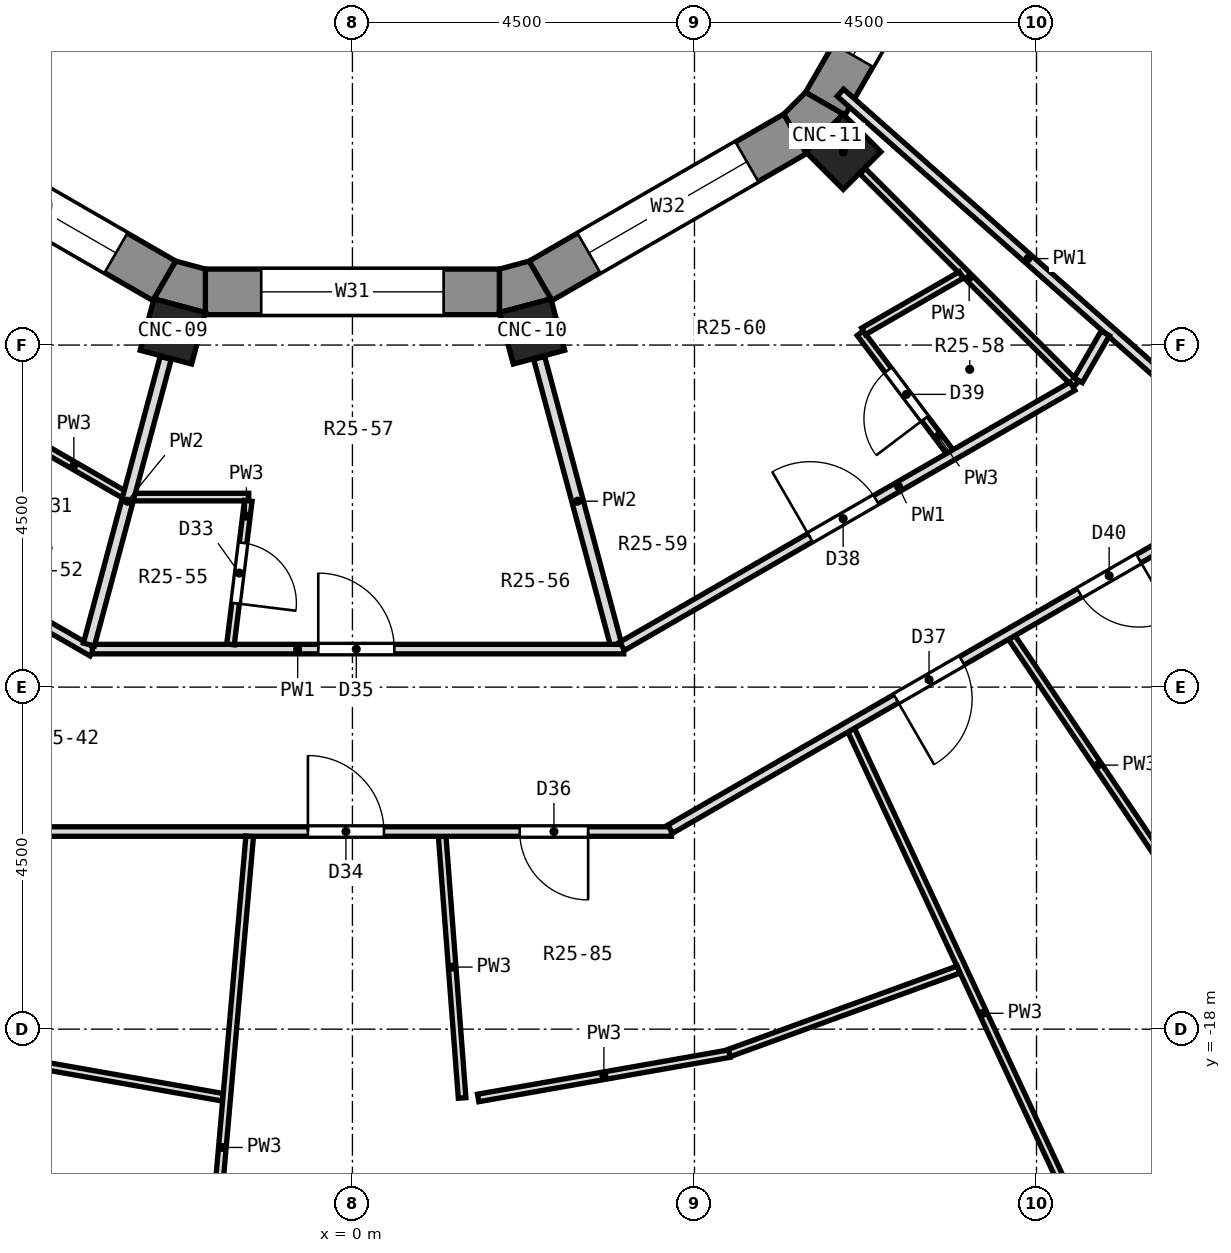
"""IFC4 building model, lengths in metres.
Left out: names, types, materials, properties, quantities, classifications, styles, units other than length and angle.
Written with IfcOpenShell. Run it as: python <this file> out.ifc"""

import sys

from ifc_helpers import new_model, si_unit, direction, frame, frame_2d, origin, origin_2d, place, context, subcontext, project, spatial, polyline, rectangle, outline, extrude, element, fill, save


model = new_model("IFC4")
c1 = context("Model", 3, precision=1e-05, world=origin(), true_north=direction((0.0, 1.0)))
c2 = subcontext(c1, "Body", "Model", "MODEL_VIEW")
j1 = project(units=[si_unit("LENGTHUNIT", "METRE"), si_unit("PLANEANGLEUNIT", "RADIAN")], contexts=[c1])
p1 = place(None, origin())
s1 = spatial("IfcSite", under=j1, at=p1, CompositionType="ELEMENT")
p2 = place(p1, origin())
s2 = spatial("IfcBuilding", under=s1, at=p2, CompositionType="ELEMENT")
p3 = place(p2, frame((0.0, 0.0, 160.8)))
s3 = spatial("IfcBuildingStorey", under=s2, at=p3, CompositionType="ELEMENT", Elevation=160.8)
for number, where, z_axis, x_axis in (
    (1, (-2.364, -8.821, 0.0), (0.0, 0.0, 1.0), (-0.259, -0.966, 0.0)),
    (2, (2.364, -8.821, 0.0), (0.0, 0.0, 1.0), (0.259, -0.966, 0.0)),
    (3, (6.458, -6.458, 0.0), (0.0, 0.0, 1.0), (0.707, -0.707, 0.0)),
):
    element("IfcColumn", number, at=place(p3, frame(where, z_axis=z_axis, x_axis=x_axis)), inside=s3, PredefinedType="COLUMN", context=c2, shape_type="SweptSolid", body=[
        extrude(rectangle(XDim=0.7, YDim=0.7, at=origin_2d()), origin(), (0.0, 0.0, 1.0), 3.3),
    ])
p4 = place(p3, frame((-5.826, -6.22, 0.0), z_axis=(0.0, 0.0, 1.0), x_axis=(0.866005929495, -0.500033728941, 0.0)))
e4 = element("IfcWall", 4, at=p4, inside=s3, PredefinedType="SOLIDWALL", context=c2, shape_type="SweptSolid", body=[
    extrude(rectangle(XDim=3.87, YDim=0.6, at=frame_2d((1.935, 0.0))), origin(), (0.0, 0.0, 1.0), 2.85),
])
p5 = place(p4, frame((0.735, 0.0, 0.9)))
e5 = element("IfcOpeningElement", 5, at=p5, cuts=e4, PredefinedType="OPENING", context=c2, shape_type="SweptSolid", body=[
    extrude(rectangle(XDim=2.4, YDim=1.8, at=frame_2d((1.2, 0.9))), frame((0.0, 0.312, 0.0), z_axis=(0.0, -1.0, 0.0), x_axis=(1.0, 0.0, 0.0)), (0.0, 0.0, 1.0), 0.624),
])
p6 = place(p3, frame((-1.935, -8.3, 0.0), z_axis=(0.0, 0.0, 1.0), x_axis=(1.0, 0.0, 0.0)))
e6 = element("IfcWall", 6, at=p6, inside=s3, PredefinedType="SOLIDWALL", context=c2, shape_type="SweptSolid", body=[
    extrude(rectangle(XDim=3.87, YDim=0.6, at=frame_2d((1.935, 0.0))), origin(), (0.0, 0.0, 1.0), 2.85),
])
p7 = place(p6, frame((0.735, 0.0, 0.9)))
e7 = element("IfcOpeningElement", 7, at=p7, cuts=e6, PredefinedType="OPENING", context=c2, shape_type="SweptSolid", body=[
    extrude(rectangle(XDim=2.4, YDim=1.8, at=frame_2d((1.2, 0.9))), frame((0.0, 0.312, 0.0), z_axis=(0.0, -1.0, 0.0), x_axis=(1.0, 0.0, 0.0)), (0.0, 0.0, 1.0), 0.624),
])
p8 = place(p3, frame((2.474, -8.156, 0.0), z_axis=(0.0, 0.0, 1.0), x_axis=(0.866005929495, 0.500033728941, 0.0)))
e8 = element("IfcWall", 8, at=p8, inside=s3, PredefinedType="SOLIDWALL", context=c2, shape_type="SweptSolid", body=[
    extrude(rectangle(XDim=3.87, YDim=0.6, at=frame_2d((1.935, 0.0))), origin(), (0.0, 0.0, 1.0), 2.85),
])
p9 = place(p8, frame((0.735, 0.0, 0.9)))
e9 = element("IfcOpeningElement", 9, at=p9, cuts=e8, PredefinedType="OPENING", context=c2, shape_type="SweptSolid", body=[
    extrude(rectangle(XDim=2.4, YDim=1.8, at=frame_2d((1.2, 0.9))), frame((0.0, 0.312, 0.0), z_axis=(0.0, -1.0, 0.0), x_axis=(1.0, 0.0, 0.0)), (0.0, 0.0, 1.0), 0.624),
])
p10 = place(p3, frame((6.22, -5.826, 0.0), z_axis=(0.0, 0.0, 1.0), x_axis=(0.500033728941, 0.866005929495, 0.0)))
e10 = element("IfcWall", 10, at=p10, inside=s3, PredefinedType="SOLIDWALL", context=c2, shape_type="SweptSolid", body=[
    extrude(rectangle(XDim=3.87, YDim=0.6, at=frame_2d((1.935, 0.0))), origin(), (0.0, 0.0, 1.0), 2.85),
])
p11 = place(p10, frame((0.735, 0.0, 0.9)))
e11 = element("IfcOpeningElement", 11, at=p11, cuts=e10, PredefinedType="OPENING", context=c2, shape_type="SweptSolid", body=[
    extrude(rectangle(XDim=2.4, YDim=1.8, at=frame_2d((1.2, 0.9))), frame((0.0, 0.312, 0.0), z_axis=(0.0, -1.0, 0.0), x_axis=(1.0, 0.0, 0.0)), (0.0, 0.0, 1.0), 0.624),
])
p12 = place(p3, origin())
e12 = element("IfcWall", 12, at=p12, inside=s3, PredefinedType="SOLIDWALL", context=c2, shape_type="SweptSolid", body=[
    extrude(outline(polyline([(-1.935, -8.573), (-1.935, -8.0), (-2.324, -7.896), (-2.611, -8.392), (-1.935, -8.573)])), origin(), (0.0, 0.0, 1.0), 2.85),
])
p13 = place(p3, origin())
e13 = element("IfcWall", 13, at=p13, inside=s3, PredefinedType="SOLIDWALL", context=c2, shape_type="SweptSolid", body=[
    extrude(outline(polyline([(2.611, -8.392), (2.324, -7.896), (1.935, -8.0), (1.935, -8.573), (2.611, -8.392)])), origin(), (0.0, 0.0, 1.0), 2.85),
])
p14 = place(p3, origin())
e14 = element("IfcWall", 14, at=p14, inside=s3, PredefinedType="SOLIDWALL", context=c2, shape_type="SweptSolid", body=[
    extrude(outline(polyline([(5.962, -6.458), (6.458, -5.962), (5.961, -5.676), (5.676, -5.961), (5.962, -6.458)])), origin(), (0.0, 0.0, 1.0), 2.85),
])
p15 = place(p3, frame((1.181, -15.462, 0.0), z_axis=(0.0, 0.0, 1.0), x_axis=(0.07601515228, -0.997106662611, 0.0)))
e15 = element("IfcWall", 15, at=p15, inside=s3, PredefinedType="PARTITIONING", context=c2, shape_type="SweptSolid", body=[
    extrude(rectangle(XDim=3.453, YDim=0.1, at=frame_2d((1.726, 0.0))), origin(), (0.0, 0.0, 1.0), 2.85),
])
p16 = place(p3, frame((2.457, -9.169, 0.0), z_axis=(0.0, 0.0, 1.0), x_axis=(0.258849662474, -0.965917621869, 0.0)))
e16 = element("IfcWall", 16, at=p16, inside=s3, PredefinedType="PARTITIONING", context=c2, shape_type="SweptSolid", body=[
    extrude(rectangle(XDim=3.904, YDim=0.15, at=frame_2d((1.952, 0.0))), origin(), (0.0, 0.0, 1.0), 2.85),
])
p17 = place(p3, frame((6.562, -14.066, 0.0), z_axis=(0.0, 0.0, 1.0), x_axis=(0.422374740617, -0.906421302976, 0.0)))
e17 = element("IfcWall", 17, at=p17, inside=s3, PredefinedType="PARTITIONING", context=c2, shape_type="SweptSolid", body=[
    extrude(rectangle(XDim=8.218, YDim=0.1, at=frame_2d((4.109, 0.0))), origin(), (0.0, 0.0, 1.0), 2.85),
])
p18 = place(p3, frame((8.674, -12.847, 0.0), z_axis=(0.0, 0.0, 1.0), x_axis=(0.559460436722, -0.828857056279, 0.0)))
e18 = element("IfcWall", 18, at=p18, inside=s3, PredefinedType="PARTITIONING", context=c2, shape_type="SweptSolid", body=[
    extrude(rectangle(XDim=4.052, YDim=0.1, at=frame_2d((2.026, 0.0))), origin(), (0.0, 0.0, 1.0), 2.85),
])
p19 = place(p3, frame((6.681, -8.844, 0.0), z_axis=(0.0, 0.0, 1.0), x_axis=(0.602656270697, -0.798000889341, 0.0)))
e19 = element("IfcWall", 19, at=p19, inside=s3, PredefinedType="PARTITIONING", context=c2, shape_type="SweptSolid", body=[
    extrude(rectangle(XDim=1.953, YDim=0.1, at=frame_2d((0.977, 0.0))), origin(), (0.0, 0.0, 1.0), 2.85),
])
p20 = place(p19, frame((0.608, 0.0, 0.0)))
e20 = element("IfcOpeningElement", 20, at=p20, cuts=e19, PredefinedType="OPENING", context=c2, shape_type="SweptSolid", body=[
    extrude(rectangle(XDim=0.8, YDim=2.1, at=frame_2d((0.4, 1.05))), frame((0.0, 0.062, 0.0), z_axis=(0.0, -1.0, 0.0), x_axis=(1.0, 0.0, 0.0)), (0.0, 0.0, 1.0), 0.124),
])
p21 = place(p3, frame((6.712, -6.712, 0.0), z_axis=(0.0, 0.0, 1.0), x_axis=(0.707106781187, -0.707106781187, 0.0)))
e21 = element("IfcWall", 21, at=p21, inside=s3, PredefinedType="PARTITIONING", context=c2, shape_type="SweptSolid", body=[
    extrude(rectangle(XDim=3.967, YDim=0.1, at=frame_2d((1.983, 0.0))), origin(), (0.0, 0.0, 1.0), 2.85),
])
p22 = place(p3, frame((6.42, -5.68, 0.0), z_axis=(0.0, 0.0, 1.0), x_axis=(0.748956953748, -0.662618654607, 0.0)))
e22 = element("IfcWall", 22, at=p22, inside=s3, PredefinedType="PARTITIONING", context=c2, shape_type="SweptSolid", body=[
    extrude(rectangle(XDim=6.589, YDim=0.125, at=frame_2d((3.294, 0.0))), origin(), (0.0, 0.0, 1.0), 2.85),
])
p23 = place(p3, frame((-9.463, -9.548, 0.0), z_axis=(0.0, 0.0, 1.0), x_axis=(0.866077207726, -0.499910262205, 0.0)))
e23 = element("IfcWall", 23, at=p23, inside=s3, PredefinedType="PARTITIONING", context=c2, shape_type="SweptSolid", body=[
    extrude(rectangle(XDim=6.977, YDim=0.125, at=frame_2d((3.488, 0.0))), origin(), (0.0, 0.0, 1.0), 2.85),
])
p24 = place(p23, frame((2.87, 0.0, 0.0)))
e24 = element("IfcOpeningElement", 24, at=p24, cuts=e23, PredefinedType="OPENING", context=c2, shape_type="SweptSolid", body=[
    extrude(rectangle(XDim=1.0, YDim=2.1, at=frame_2d((0.5, 1.05))), frame((0.0, 0.074, 0.0), z_axis=(0.0, -1.0, 0.0), x_axis=(1.0, 0.0, 0.0)), (0.0, 0.0, 1.0), 0.149),
])
p25 = place(p3, frame((-4.319, -10.208, 0.0), z_axis=(0.0, 0.0, 1.0), x_axis=(0.866104780601, -0.499862490111, 0.0)))
e25 = element("IfcWall", 25, at=p25, inside=s3, PredefinedType="PARTITIONING", context=c2, shape_type="SweptSolid", body=[
    extrude(rectangle(XDim=1.509, YDim=0.1, at=frame_2d((0.755, 0.0))), origin(), (0.0, 0.0, 1.0), 2.85),
])
p26 = place(p3, frame((-4.863, -18.339, 0.0), z_axis=(0.0, 0.0, 1.0), x_axis=(0.984782026727, -0.173794015534, 0.0)))
e26 = element("IfcWall", 26, at=p26, inside=s3, PredefinedType="PARTITIONING", context=c2, shape_type="SweptSolid", body=[
    extrude(rectangle(XDim=3.208, YDim=0.1, at=frame_2d((1.604, 0.0))), origin(), (0.0, 0.0, 1.0), 2.85),
])
p27 = place(p3, frame((-4.063, -15.4, 0.0), z_axis=(0.0, 0.0, 1.0), x_axis=(1.0, 0.0, 0.0)))
e27 = element("IfcWall", 27, at=p27, inside=s3, PredefinedType="PARTITIONING", context=c2, shape_type="SweptSolid", body=[
    extrude(rectangle(XDim=8.262, YDim=0.125, at=frame_2d((4.131, 0.0))), origin(), (0.0, 0.0, 1.0), 2.85),
])
p28 = place(p27, frame((3.478, 0.0, 0.0)))
e28 = element("IfcOpeningElement", 28, at=p28, cuts=e27, PredefinedType="OPENING", context=c2, shape_type="SweptSolid", body=[
    extrude(rectangle(XDim=1.0, YDim=2.1, at=frame_2d((0.5, 1.05))), frame((0.0, 0.074, 0.0), z_axis=(0.0, -1.0, 0.0), x_axis=(1.0, 0.0, 0.0)), (0.0, 0.0, 1.0), 0.149),
])
p29 = place(p27, frame((6.264, 0.0, 0.0)))
e29 = element("IfcOpeningElement", 29, at=p29, cuts=e27, PredefinedType="OPENING", context=c2, shape_type="SweptSolid", body=[
    extrude(rectangle(XDim=0.9, YDim=2.1, at=frame_2d((0.45, 1.05))), frame((0.0, 0.074, 0.0), z_axis=(0.0, -1.0, 0.0), x_axis=(1.0, 0.0, 0.0)), (0.0, 0.0, 1.0), 0.149),
])
p30 = place(p3, frame((-3.42, -13.0, 0.0), z_axis=(0.0, 0.0, 1.0), x_axis=(1.0, 0.0, 0.0)))
e30 = element("IfcWall", 30, at=p30, inside=s3, PredefinedType="PARTITIONING", context=c2, shape_type="SweptSolid", body=[
    extrude(rectangle(XDim=6.99, YDim=0.125, at=frame_2d((3.495, 0.0))), origin(), (0.0, 0.0, 1.0), 2.85),
])
p31 = place(p30, frame((2.971, 0.0, 0.0)))
e31 = element("IfcOpeningElement", 31, at=p31, cuts=e30, PredefinedType="OPENING", context=c2, shape_type="SweptSolid", body=[
    extrude(rectangle(XDim=1.0, YDim=2.1, at=frame_2d((0.5, 1.05))), frame((0.0, 0.074, 0.0), z_axis=(0.0, -1.0, 0.0), x_axis=(1.0, 0.0, 0.0)), (0.0, 0.0, 1.0), 0.149),
])
p32 = place(p3, frame((-2.872, -11.0, 0.0), z_axis=(0.0, 0.0, 1.0), x_axis=(1.0, 0.0, 0.0)))
e32 = element("IfcWall", 32, at=p32, inside=s3, PredefinedType="PARTITIONING", context=c2, shape_type="SweptSolid", body=[
    extrude(rectangle(XDim=1.508, YDim=0.1, at=frame_2d((0.754, 0.0))), origin(), (0.0, 0.0, 1.0), 2.85),
])
p33 = place(p3, frame((1.654, -18.905, 0.0), z_axis=(0.0, 0.0, 1.0), x_axis=(0.984783558818, 0.173785333909, 0.0)))
e33 = element("IfcWall", 33, at=p33, inside=s3, PredefinedType="PARTITIONING", context=c2, shape_type="SweptSolid", body=[
    extrude(rectangle(XDim=3.359, YDim=0.1, at=frame_2d((1.679, 0.0))), origin(), (0.0, 0.0, 1.0), 2.85),
])
p34 = place(p3, frame((4.959, -18.313, 0.0), z_axis=(0.0, 0.0, 1.0), x_axis=(0.939697820391, 0.34200585719, 0.0)))
e34 = element("IfcWall", 34, at=p34, inside=s3, PredefinedType="PARTITIONING", context=c2, shape_type="SweptSolid", body=[
    extrude(rectangle(XDim=3.207, YDim=0.1, at=frame_2d((1.604, 0.0))), origin(), (0.0, 0.0, 1.0), 2.85),
])
p35 = place(p3, frame((4.18, -15.369, 0.0), z_axis=(0.0, 0.0, 1.0), x_axis=(0.86608029966, 0.499904905498, 0.0)))
e35 = element("IfcWall", 35, at=p35, inside=s3, PredefinedType="PARTITIONING", context=c2, shape_type="SweptSolid", body=[
    extrude(rectangle(XDim=8.263, YDim=0.125, at=frame_2d((4.131, 0.0))), origin(), (0.0, 0.0, 1.0), 2.85),
])
p36 = place(p35, frame((3.432, 0.0, 0.0)))
e36 = element("IfcOpeningElement", 36, at=p36, cuts=e35, PredefinedType="OPENING", context=c2, shape_type="SweptSolid", body=[
    extrude(rectangle(XDim=1.0, YDim=2.1, at=frame_2d((0.5, 1.05))), frame((0.0, 0.074, 0.0), z_axis=(0.0, -1.0, 0.0), x_axis=(1.0, 0.0, 0.0)), (0.0, 0.0, 1.0), 0.149),
])
p37 = place(p35, frame((6.219, 0.0, 0.0)))
e37 = element("IfcOpeningElement", 37, at=p37, cuts=e35, PredefinedType="OPENING", context=c2, shape_type="SweptSolid", body=[
    extrude(rectangle(XDim=0.9, YDim=2.1, at=frame_2d((0.45, 1.05))), frame((0.0, 0.074, 0.0), z_axis=(0.0, -1.0, 0.0), x_axis=(1.0, 0.0, 0.0)), (0.0, 0.0, 1.0), 0.149),
])
p38 = place(p3, frame((3.548, -12.962, 0.0), z_axis=(0.0, 0.0, 1.0), x_axis=(0.866078638394, 0.499907783615, 0.0)))
e38 = element("IfcWall", 38, at=p38, inside=s3, PredefinedType="PARTITIONING", context=c2, shape_type="SweptSolid", body=[
    extrude(rectangle(XDim=6.842, YDim=0.125, at=frame_2d((3.421, 0.0))), origin(), (0.0, 0.0, 1.0), 2.85),
])
p39 = place(p38, frame((2.858, 0.0, 0.0)))
e39 = element("IfcOpeningElement", 39, at=p39, cuts=e38, PredefinedType="OPENING", context=c2, shape_type="SweptSolid", body=[
    extrude(rectangle(XDim=1.0, YDim=2.1, at=frame_2d((0.5, 1.05))), frame((0.0, 0.074, 0.0), z_axis=(0.0, -1.0, 0.0), x_axis=(1.0, 0.0, 0.0)), (0.0, 0.0, 1.0), 0.149),
])
p40 = place(p3, frame((6.724, -8.819, 0.0), z_axis=(0.0, 0.0, 1.0), x_axis=(0.866292397233, 0.499537268376, 0.0)))
e40 = element("IfcWall", 40, at=p40, inside=s3, PredefinedType="PARTITIONING", context=c2, shape_type="SweptSolid", body=[
    extrude(rectangle(XDim=1.484, YDim=0.1, at=frame_2d((0.742, 0.0))), origin(), (0.0, 0.0, 1.0), 2.85),
])
p41 = place(p3, frame((9.548, -9.463, 0.0), z_axis=(0.0, 0.0, 1.0), x_axis=(0.499821239653, 0.866128586522, 0.0)))
e41 = element("IfcWall", 41, at=p41, inside=s3, PredefinedType="PARTITIONING", context=c2, shape_type="SweptSolid", body=[
    extrude(rectangle(XDim=0.713, YDim=0.125, at=frame_2d((0.356, 0.0))), origin(), (0.0, 0.0, 1.0), 2.85),
])
p42 = place(p3, frame((-3.467, -12.94, 0.0), z_axis=(0.0, 0.0, 1.0), x_axis=(0.258732959093, 0.965948888854, 0.0)))
e42 = element("IfcWall", 42, at=p42, inside=s3, PredefinedType="PARTITIONING", context=c2, shape_type="SweptSolid", body=[
    extrude(rectangle(XDim=3.904, YDim=0.15, at=frame_2d((1.952, 0.0))), origin(), (0.0, 0.0, 1.0), 2.85),
])
p43 = place(p3, frame((-1.604, -12.938, 0.0), z_axis=(0.0, 0.0, 1.0), x_axis=(0.123039852559, 0.992401730491, 0.0)))
e43 = element("IfcWall", 43, at=p43, inside=s3, PredefinedType="PARTITIONING", context=c2, shape_type="SweptSolid", body=[
    extrude(rectangle(XDim=1.903, YDim=0.1, at=frame_2d((0.951, 0.0))), origin(), (0.0, 0.0, 1.0), 2.85),
])
p44 = place(p43, frame((0.545, 0.0, 0.0)))
e44 = element("IfcOpeningElement", 44, at=p44, cuts=e43, PredefinedType="OPENING", context=c2, shape_type="SweptSolid", body=[
    extrude(rectangle(XDim=0.8, YDim=2.1, at=frame_2d((0.4, 1.05))), frame((0.0, 0.062, 0.0), z_axis=(0.0, -1.0, 0.0), x_axis=(1.0, 0.0, 0.0)), (0.0, 0.0, 1.0), 0.124),
])
p45 = place(p3, frame((-2.071, -23.649, 0.0), z_axis=(0.0, 0.0, 1.0), x_axis=(0.087543554658, 0.996160692879, 0.0)))
e45 = element("IfcWall", 45, at=p45, inside=s3, PredefinedType="PARTITIONING", context=c2, shape_type="SweptSolid", body=[
    extrude(rectangle(XDim=8.219, YDim=0.1, at=frame_2d((4.109, 0.0))), origin(), (0.0, 0.0, 1.0), 2.85),
])
p46 = place(p5, origin())
e46 = element("IfcWindow", 46, at=p46, inside=s3, PartitioningType="SINGLE_PANEL", PredefinedType="WINDOW", context=c2, shape_type="SweptSolid", body=[
    extrude(rectangle(XDim=2.4, YDim=1.8, at=frame_2d((1.2, 0.9))), frame((0.0, -0.12, 0.0), z_axis=(0.0, -1.0, 0.0), x_axis=(1.0, 0.0, 0.0)), (0.0, 0.0, 1.0), 0.06),
])
fill(e5, e46)
p47 = place(p7, origin())
e47 = element("IfcWindow", 47, at=p47, inside=s3, PartitioningType="SINGLE_PANEL", PredefinedType="WINDOW", context=c2, shape_type="SweptSolid", body=[
    extrude(rectangle(XDim=2.4, YDim=1.8, at=frame_2d((1.2, 0.9))), frame((0.0, -0.12, 0.0), z_axis=(0.0, -1.0, 0.0), x_axis=(1.0, 0.0, 0.0)), (0.0, 0.0, 1.0), 0.06),
])
fill(e7, e47)
p48 = place(p9, origin())
e48 = element("IfcWindow", 48, at=p48, inside=s3, PartitioningType="SINGLE_PANEL", PredefinedType="WINDOW", context=c2, shape_type="SweptSolid", body=[
    extrude(rectangle(XDim=2.4, YDim=1.8, at=frame_2d((1.2, 0.9))), frame((0.0, -0.12, 0.0), z_axis=(0.0, -1.0, 0.0), x_axis=(1.0, 0.0, 0.0)), (0.0, 0.0, 1.0), 0.06),
])
fill(e9, e48)
p49 = place(p11, origin())
e49 = element("IfcWindow", 49, at=p49, inside=s3, PartitioningType="SINGLE_PANEL", PredefinedType="WINDOW", context=c2, shape_type="SweptSolid", body=[
    extrude(rectangle(XDim=2.4, YDim=1.8, at=frame_2d((1.2, 0.9))), frame((0.0, -0.12, 0.0), z_axis=(0.0, -1.0, 0.0), x_axis=(1.0, 0.0, 0.0)), (0.0, 0.0, 1.0), 0.06),
])
fill(e11, e49)
p50 = place(p44, frame((0.8, 0.0, 0.0), z_axis=(0.0, 0.0, 1.0), x_axis=(-1.0, 0.0, 0.0)))
e50 = element("IfcDoor", 50, at=p50, inside=s3, OperationType="SINGLE_SWING_RIGHT", PredefinedType="DOOR", context=c2, shape_type="SweptSolid", body=[
    extrude(rectangle(XDim=0.8, YDim=2.1, at=frame_2d((0.4, 1.05))), frame((0.0, 0.025, 0.0), z_axis=(0.0, -1.0, 0.0), x_axis=(1.0, 0.0, 0.0)), (0.0, 0.0, 1.0), 0.05),
])
fill(e44, e50)
p51 = place(p28, origin())
e51 = element("IfcDoor", 51, at=p51, inside=s3, OperationType="SINGLE_SWING_LEFT", PredefinedType="DOOR", context=c2, shape_type="SweptSolid", body=[
    extrude(rectangle(XDim=1.0, YDim=2.1, at=frame_2d((0.5, 1.05))), frame((0.0, 0.025, 0.0), z_axis=(0.0, -1.0, 0.0), x_axis=(1.0, 0.0, 0.0)), (0.0, 0.0, 1.0), 0.05),
])
fill(e28, e51)
p52 = place(p31, origin())
e52 = element("IfcDoor", 52, at=p52, inside=s3, OperationType="SINGLE_SWING_LEFT", PredefinedType="DOOR", context=c2, shape_type="SweptSolid", body=[
    extrude(rectangle(XDim=1.0, YDim=2.1, at=frame_2d((0.5, 1.05))), frame((0.0, 0.025, 0.0), z_axis=(0.0, -1.0, 0.0), x_axis=(1.0, 0.0, 0.0)), (0.0, 0.0, 1.0), 0.05),
])
fill(e31, e52)
p53 = place(p29, frame((0.9, 0.0, 0.0), z_axis=(0.0, 0.0, 1.0), x_axis=(-1.0, 0.0, 0.0)))
e53 = element("IfcDoor", 53, at=p53, inside=s3, OperationType="SINGLE_SWING_LEFT", PredefinedType="DOOR", context=c2, shape_type="SweptSolid", body=[
    extrude(rectangle(XDim=0.9, YDim=2.1, at=frame_2d((0.45, 1.05))), frame((0.0, 0.025, 0.0), z_axis=(0.0, -1.0, 0.0), x_axis=(1.0, 0.0, 0.0)), (0.0, 0.0, 1.0), 0.05),
])
fill(e29, e53)
p54 = place(p36, frame((1.0, 0.0, 0.0), z_axis=(0.0, 0.0, 1.0), x_axis=(-1.0, 0.0, 0.0)))
e54 = element("IfcDoor", 54, at=p54, inside=s3, OperationType="SINGLE_SWING_RIGHT", PredefinedType="DOOR", context=c2, shape_type="SweptSolid", body=[
    extrude(rectangle(XDim=1.0, YDim=2.1, at=frame_2d((0.5, 1.05))), frame((0.0, 0.025, 0.0), z_axis=(0.0, -1.0, 0.0), x_axis=(1.0, 0.0, 0.0)), (0.0, 0.0, 1.0), 0.05),
])
fill(e36, e54)
p55 = place(p39, origin())
e55 = element("IfcDoor", 55, at=p55, inside=s3, OperationType="SINGLE_SWING_LEFT", PredefinedType="DOOR", context=c2, shape_type="SweptSolid", body=[
    extrude(rectangle(XDim=1.0, YDim=2.1, at=frame_2d((0.5, 1.05))), frame((0.0, 0.025, 0.0), z_axis=(0.0, -1.0, 0.0), x_axis=(1.0, 0.0, 0.0)), (0.0, 0.0, 1.0), 0.05),
])
fill(e39, e55)
p56 = place(p20, frame((0.8, 0.0, 0.0), z_axis=(0.0, 0.0, 1.0), x_axis=(-1.0, 0.0, 0.0)))
e56 = element("IfcDoor", 56, at=p56, inside=s3, OperationType="SINGLE_SWING_LEFT", PredefinedType="DOOR", context=c2, shape_type="SweptSolid", body=[
    extrude(rectangle(XDim=0.8, YDim=2.1, at=frame_2d((0.4, 1.05))), frame((0.0, 0.025, 0.0), z_axis=(0.0, -1.0, 0.0), x_axis=(1.0, 0.0, 0.0)), (0.0, 0.0, 1.0), 0.05),
])
fill(e20, e56)
p57 = place(p37, frame((0.9, 0.0, 0.0), z_axis=(0.0, 0.0, 1.0), x_axis=(-1.0, 0.0, 0.0)))
e57 = element("IfcDoor", 57, at=p57, inside=s3, OperationType="SINGLE_SWING_LEFT", PredefinedType="DOOR", context=c2, shape_type="SweptSolid", body=[
    extrude(rectangle(XDim=0.9, YDim=2.1, at=frame_2d((0.45, 1.05))), frame((0.0, 0.025, 0.0), z_axis=(0.0, -1.0, 0.0), x_axis=(1.0, 0.0, 0.0)), (0.0, 0.0, 1.0), 0.05),
])
fill(e37, e57)
save(model, sys.argv[1])
